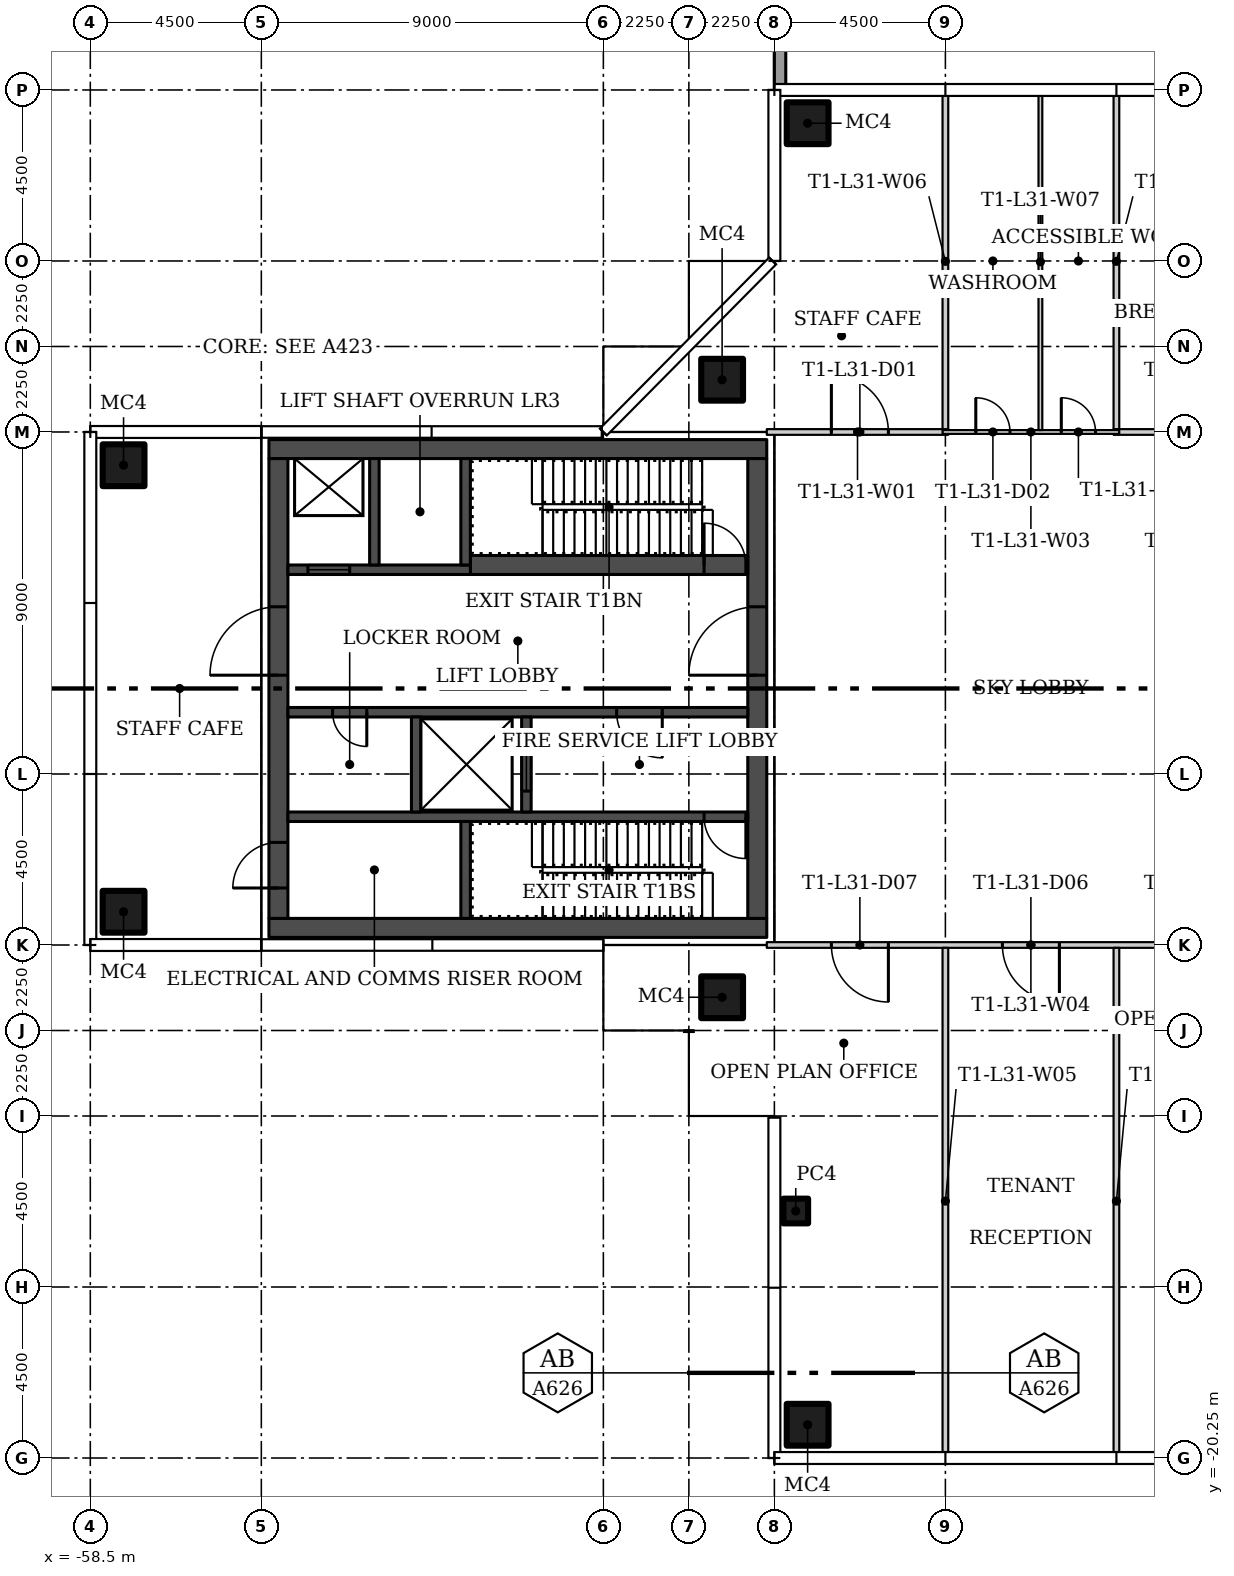
"""IFC4 building model, lengths in metres.
Left out: names, types, materials, properties, quantities, classifications, styles, units other than length and angle.
Written with IfcOpenShell. Run it as: python <this file> out.ifc"""

import sys

from ifc_helpers import new_model, si_unit, direction, frame, frame_2d, origin, origin_2d, place, context, subcontext, project, spatial, rectangle, hollow_rectangle, extrude, element, fill, save


model = new_model("IFC4")
c1 = context("Model", 3, precision=1e-05, world=origin(), true_north=direction((0.0, 1.0)))
c2 = subcontext(c1, "Body", "Model", "MODEL_VIEW")
j1 = project(units=[si_unit("LENGTHUNIT", "METRE"), si_unit("PLANEANGLEUNIT", "RADIAN")], contexts=[c1])
p1 = place(None, origin())
s1 = spatial("IfcSite", under=j1, at=p1, CompositionType="ELEMENT")
p2 = place(p1, origin())
s2 = spatial("IfcBuilding", under=s1, at=p2, CompositionType="ELEMENT")
p3 = place(p2, frame((0.0, 0.0, 133.5)))
s3 = spatial("IfcBuildingStorey", under=s2, at=p3, CompositionType="ELEMENT", Elevation=133.5)
for number, where in (
    (1, (-41.875, 8.125, 0.0)),
    (2, (-41.875, -8.125, 0.0)),
    (3, (-57.625, -5.875, 0.0)),
    (4, (-57.625, 5.875, 0.0)),
    (5, (-39.625, 14.875, 0.0)),
):
    element("IfcColumn", number, at=place(p3, frame(where)), inside=s3, PredefinedType="COLUMN", context=c2, shape_type="SweptSolid", body=[
        extrude(hollow_rectangle(XDim=1.1, YDim=1.1, WallThickness=0.04, at=origin_2d()), origin(), (0.0, 0.0, 1.0), 5.05),
    ])
p4 = place(p3, frame((-39.938, -13.75, 0.0)))
e6 = element("IfcColumn", 6, at=p4, inside=s3, PredefinedType="COLUMN", context=c2, shape_type="SweptSolid", body=[
    extrude(hollow_rectangle(XDim=0.65, YDim=0.65, WallThickness=0.02, at=origin_2d()), origin(), (0.0, 0.0, 1.0), 5.05),
])
p5 = place(p3, frame((-39.625, -19.375, 0.0)))
e7 = element("IfcColumn", 7, at=p5, inside=s3, PredefinedType="COLUMN", context=c2, shape_type="SweptSolid", body=[
    extrude(hollow_rectangle(XDim=1.1, YDim=1.1, WallThickness=0.04, at=origin_2d()), origin(), (0.0, 0.0, 1.0), 5.05),
])
p6 = place(p3, frame((-40.7, 6.75, 0.0)))
e8 = element("IfcWall", 8, at=p6, inside=s3, PredefinedType="PARTITIONING", context=c2, shape_type="SweptSolid", body=[
    extrude(rectangle(XDim=4.775, YDim=0.15, at=frame_2d((2.387, 0.0))), origin(), (0.0, 0.0, 1.0), 5.05),
])
p7 = place(p6, frame((1.7, 0.0, 0.0)))
e9 = element("IfcOpeningElement", 9, at=p7, cuts=e8, PredefinedType="OPENING", context=c2, shape_type="SweptSolid", body=[
    extrude(rectangle(XDim=1.5, YDim=2.1, at=frame_2d((0.75, 1.05))), frame((0.0, 0.085, 0.0), z_axis=(0.0, -1.0, 0.0), x_axis=(1.0, 0.0, 0.0)), (0.0, 0.0, 1.0), 0.17),
])
p8 = place(p3, frame((-31.575, 6.75, 0.0)))
e10 = element("IfcWall", 10, at=p8, inside=s3, PredefinedType="PARTITIONING", context=c2, shape_type="SweptSolid", body=[
    extrude(rectangle(XDim=4.775, YDim=0.15, at=frame_2d((2.387, 0.0))), origin(), (0.0, 0.0, 1.0), 5.05),
])
p9 = place(p8, frame((1.575, 0.0, 0.0)))
e11 = element("IfcOpeningElement", 11, at=p9, cuts=e10, PredefinedType="OPENING", context=c2, shape_type="SweptSolid", body=[
    extrude(rectangle(XDim=1.5, YDim=2.1, at=frame_2d((0.75, 1.05))), frame((0.0, 0.085, 0.0), z_axis=(0.0, -1.0, 0.0), x_axis=(1.0, 0.0, 0.0)), (0.0, 0.0, 1.0), 0.17),
])
p10 = place(p3, frame((-36.075, 6.75, 0.0)))
e12 = element("IfcWall", 12, at=p10, inside=s3, PredefinedType="PARTITIONING", context=c2, shape_type="SweptSolid", body=[
    extrude(rectangle(XDim=4.65, YDim=0.1, at=frame_2d((2.325, 0.0))), origin(), (0.0, 0.0, 1.0), 5.05),
])
p11 = place(p10, frame((0.875, 0.0, 0.0)))
e13 = element("IfcOpeningElement", 13, at=p11, cuts=e12, PredefinedType="OPENING", context=c2, shape_type="SweptSolid", body=[
    extrude(rectangle(XDim=0.9, YDim=2.1, at=frame_2d((0.45, 1.05))), frame((0.0, 0.06, 0.0), z_axis=(0.0, -1.0, 0.0), x_axis=(1.0, 0.0, 0.0)), (0.0, 0.0, 1.0), 0.12),
])
p12 = place(p10, frame((3.125, 0.0, 0.0)))
e14 = element("IfcOpeningElement", 14, at=p12, cuts=e12, PredefinedType="OPENING", context=c2, shape_type="SweptSolid", body=[
    extrude(rectangle(XDim=0.9, YDim=2.1, at=frame_2d((0.45, 1.05))), frame((0.0, 0.06, 0.0), z_axis=(0.0, -1.0, 0.0), x_axis=(1.0, 0.0, 0.0)), (0.0, 0.0, 1.0), 0.12),
])
p13 = place(p3, frame((-26.8, -6.75, 0.0), z_axis=(0.0, 0.0, 1.0), x_axis=(-1.0, 0.0, 0.0)))
e15 = element("IfcWall", 15, at=p13, inside=s3, PredefinedType="PARTITIONING", context=c2, shape_type="SweptSolid", body=[
    extrude(rectangle(XDim=13.9, YDim=0.15, at=frame_2d((6.95, 0.0))), origin(), (0.0, 0.0, 1.0), 5.05),
])
p14 = place(p13, frame((1.7, 0.0, 0.0)))
e16 = element("IfcOpeningElement", 16, at=p14, cuts=e15, PredefinedType="OPENING", context=c2, shape_type="SweptSolid", body=[
    extrude(rectangle(XDim=1.5, YDim=2.1, at=frame_2d((0.75, 1.05))), frame((0.0, 0.085, 0.0), z_axis=(0.0, -1.0, 0.0), x_axis=(1.0, 0.0, 0.0)), (0.0, 0.0, 1.0), 0.17),
])
p15 = place(p13, frame((6.2, 0.0, 0.0)))
e17 = element("IfcOpeningElement", 17, at=p15, cuts=e15, PredefinedType="OPENING", context=c2, shape_type="SweptSolid", body=[
    extrude(rectangle(XDim=1.5, YDim=2.1, at=frame_2d((0.75, 1.05))), frame((0.0, 0.085, 0.0), z_axis=(0.0, -1.0, 0.0), x_axis=(1.0, 0.0, 0.0)), (0.0, 0.0, 1.0), 0.17),
])
p16 = place(p13, frame((10.7, 0.0, 0.0)))
e18 = element("IfcOpeningElement", 18, at=p16, cuts=e15, PredefinedType="OPENING", context=c2, shape_type="SweptSolid", body=[
    extrude(rectangle(XDim=1.5, YDim=2.1, at=frame_2d((0.75, 1.05))), frame((0.0, 0.085, 0.0), z_axis=(0.0, -1.0, 0.0), x_axis=(1.0, 0.0, 0.0)), (0.0, 0.0, 1.0), 0.17),
])
p17 = place(p3, frame((-36.0, -20.155, 0.0), z_axis=(0.0, 0.0, 1.0), x_axis=(0.0, 1.0, 0.0)))
e19 = element("IfcWall", 19, at=p17, inside=s3, PredefinedType="PARTITIONING", context=c2, shape_type="SweptSolid", body=[
    extrude(rectangle(XDim=13.33, YDim=0.15, at=frame_2d((6.665, 0.0))), origin(), (0.0, 0.0, 1.0), 5.05),
])
p18 = place(p3, frame((-36.0, 6.825, 0.0), z_axis=(0.0, 0.0, 1.0), x_axis=(0.0, 1.0, 0.0)))
e20 = element("IfcWall", 20, at=p18, inside=s3, PredefinedType="PARTITIONING", context=c2, shape_type="SweptSolid", body=[
    extrude(rectangle(XDim=8.83, YDim=0.15, at=frame_2d((4.415, 0.0))), origin(), (0.0, 0.0, 1.0), 5.05),
])
p19 = place(p3, frame((-33.5, 6.8, 0.0), z_axis=(0.0, 0.0, 1.0), x_axis=(0.0, 1.0, 0.0)))
e21 = element("IfcWall", 21, at=p19, inside=s3, PredefinedType="PARTITIONING", context=c2, shape_type="SweptSolid", body=[
    extrude(rectangle(XDim=8.855, YDim=0.1, at=frame_2d((4.427, 0.0))), origin(), (0.0, 0.0, 1.0), 5.05),
])
p20 = place(p3, frame((-31.5, -20.155, 0.0), z_axis=(0.0, 0.0, 1.0), x_axis=(0.0, 1.0, 0.0)))
e22 = element("IfcWall", 22, at=p20, inside=s3, PredefinedType="PARTITIONING", context=c2, shape_type="SweptSolid", body=[
    extrude(rectangle(XDim=13.33, YDim=0.15, at=frame_2d((6.665, 0.0))), origin(), (0.0, 0.0, 1.0), 5.05),
])
p21 = place(p3, frame((-31.5, 6.825, 0.0), z_axis=(0.0, 0.0, 1.0), x_axis=(0.0, 1.0, 0.0)))
e23 = element("IfcWall", 23, at=p21, inside=s3, PredefinedType="PARTITIONING", context=c2, shape_type="SweptSolid", body=[
    extrude(rectangle(XDim=8.83, YDim=0.15, at=frame_2d((4.415, 0.0))), origin(), (0.0, 0.0, 1.0), 5.05),
])
p22 = place(p3, frame((-40.35, 19.95, 0.0), z_axis=(0.0, 0.0, 1.0), x_axis=(0.0, -1.0, 0.0)))
e24 = element("IfcWall", 24, at=p22, inside=s3, PredefinedType="PARAPET", context=c2, shape_type="SweptSolid", body=[
    extrude(rectangle(XDim=4.2, YDim=0.3, at=frame_2d((2.1, 0.0))), origin(), (0.0, 0.0, 1.0), 1.1),
])
for number, where, z_axis, x_axis in (
    (25, (-40.7, -6.3, 0.0), (0.0, 0.0, 1.0), (-1.0, 0.0, 0.0)),
    (26, (-40.7, 6.3, 0.0), (0.0, 0.0, 1.0), (-1.0, 0.0, 0.0)),
):
    element("IfcWall", number, at=place(p3, frame(where, z_axis=z_axis, x_axis=x_axis)), inside=s3, PredefinedType="SHEAR", context=c2, shape_type="SweptSolid", body=[
        extrude(rectangle(XDim=13.1, YDim=0.5, at=frame_2d((6.55, 0.0))), origin(), (0.0, 0.0, 1.0), 5.05),
    ])
p23 = place(p3, frame((-40.95, -6.05, 0.0), z_axis=(0.0, 0.0, 1.0), x_axis=(0.0, 1.0, 0.0)))
e27 = element("IfcWall", 27, at=p23, inside=s3, PredefinedType="SHEAR", context=c2, shape_type="SweptSolid", body=[
    extrude(rectangle(XDim=12.1, YDim=0.5, at=frame_2d((6.05, 0.0))), origin(), (0.0, 0.0, 1.0), 5.05),
])
p24 = place(p23, frame((6.4, 0.0, 0.0)))
e28 = element("IfcOpeningElement", 28, at=p24, cuts=e27, PredefinedType="OPENING", context=c2, shape_type="SweptSolid", body=[
    extrude(rectangle(XDim=1.8, YDim=2.4, at=frame_2d((0.9, 1.2))), frame((0.0, 0.26, 0.0), z_axis=(0.0, -1.0, 0.0), x_axis=(1.0, 0.0, 0.0)), (0.0, 0.0, 1.0), 0.52),
])
p25 = place(p3, frame((-53.55, -6.05, 0.0), z_axis=(0.0, 0.0, 1.0), x_axis=(0.0, 1.0, 0.0)))
e29 = element("IfcWall", 29, at=p25, inside=s3, PredefinedType="SHEAR", context=c2, shape_type="SweptSolid", body=[
    extrude(rectangle(XDim=12.1, YDim=0.5, at=frame_2d((6.05, 0.0))), origin(), (0.0, 0.0, 1.0), 5.05),
])
p26 = place(p25, frame((0.8, 0.0, 0.0)))
e30 = element("IfcOpeningElement", 30, at=p26, cuts=e29, PredefinedType="OPENING", context=c2, shape_type="SweptSolid", body=[
    extrude(rectangle(XDim=1.2, YDim=2.1, at=frame_2d((0.6, 1.05))), frame((0.0, 0.26, 0.0), z_axis=(0.0, -1.0, 0.0), x_axis=(1.0, 0.0, 0.0)), (0.0, 0.0, 1.0), 0.52),
])
p27 = place(p25, frame((6.4, 0.0, 0.0)))
e31 = element("IfcOpeningElement", 31, at=p27, cuts=e29, PredefinedType="OPENING", context=c2, shape_type="SweptSolid", body=[
    extrude(rectangle(XDim=1.8, YDim=2.4, at=frame_2d((0.9, 1.2))), frame((0.0, 0.26, 0.0), z_axis=(0.0, -1.0, 0.0), x_axis=(1.0, 0.0, 0.0)), (0.0, 0.0, 1.0), 0.52),
])
p28 = place(p3, frame((-41.2, -3.375, 0.0), z_axis=(0.0, 0.0, 1.0), x_axis=(-1.0, 0.0, 0.0)))
e32 = element("IfcWall", 32, at=p28, inside=s3, PredefinedType="SHEAR", context=c2, shape_type="SweptSolid", body=[
    extrude(rectangle(XDim=12.1, YDim=0.25, at=frame_2d((6.05, 0.0))), origin(), (0.0, 0.0, 1.0), 5.05),
])
p29 = place(p28, frame((0.05, 0.0, 0.0)))
e33 = element("IfcOpeningElement", 33, at=p29, cuts=e32, PredefinedType="OPENING", context=c2, shape_type="SweptSolid", body=[
    extrude(rectangle(XDim=1.1, YDim=2.1, at=frame_2d((0.55, 1.05))), frame((0.0, 0.135, 0.0), z_axis=(0.0, -1.0, 0.0), x_axis=(1.0, 0.0, 0.0)), (0.0, 0.0, 1.0), 0.27),
])
p30 = place(p3, frame((-48.625, -6.05, 0.0), z_axis=(0.0, 0.0, 1.0), x_axis=(0.0, 1.0, 0.0)))
e34 = element("IfcWall", 34, at=p30, inside=s3, PredefinedType="SHEAR", context=c2, shape_type="SweptSolid", body=[
    extrude(rectangle(XDim=2.55, YDim=0.25, at=frame_2d((1.275, 0.0))), origin(), (0.0, 0.0, 1.0), 5.05),
])
p31 = place(p3, frame((-41.2, -0.625, 0.0), z_axis=(0.0, 0.0, 1.0), x_axis=(-1.0, 0.0, 0.0)))
e35 = element("IfcWall", 35, at=p31, inside=s3, PredefinedType="SHEAR", context=c2, shape_type="SweptSolid", body=[
    extrude(rectangle(XDim=12.1, YDim=0.25, at=frame_2d((6.05, 0.0))), origin(), (0.0, 0.0, 1.0), 5.05),
])
p32 = place(p31, frame((2.25, 0.0, 0.0)))
e36 = element("IfcOpeningElement", 36, at=p32, cuts=e35, PredefinedType="OPENING", context=c2, shape_type="SweptSolid", body=[
    extrude(rectangle(XDim=1.2, YDim=2.1, at=frame_2d((0.6, 1.05))), frame((0.0, 0.135, 0.0), z_axis=(0.0, -1.0, 0.0), x_axis=(1.0, 0.0, 0.0)), (0.0, 0.0, 1.0), 0.27),
])
p33 = place(p31, frame((10.025, 0.0, 0.0)))
e37 = element("IfcOpeningElement", 37, at=p33, cuts=e35, PredefinedType="OPENING", context=c2, shape_type="SweptSolid", body=[
    extrude(rectangle(XDim=0.9, YDim=2.1, at=frame_2d((0.45, 1.05))), frame((0.0, 0.135, 0.0), z_axis=(0.0, -1.0, 0.0), x_axis=(1.0, 0.0, 0.0)), (0.0, 0.0, 1.0), 0.27),
])
p34 = place(p3, frame((-47.025, -3.25, 0.0), z_axis=(0.0, 0.0, 1.0), x_axis=(0.0, 1.0, 0.0)))
e38 = element("IfcWall", 38, at=p34, inside=s3, PredefinedType="SHEAR", context=c2, shape_type="SweptSolid", body=[
    extrude(rectangle(XDim=2.5, YDim=0.25, at=frame_2d((1.25, 0.0))), origin(), (0.0, 0.0, 1.0), 5.05),
])
p35 = place(p34, frame((0.55, 0.0, 0.0)))
e39 = element("IfcOpeningElement", 39, at=p35, cuts=e38, PredefinedType="OPENING", context=c2, shape_type="SweptSolid", body=[
    extrude(rectangle(XDim=1.4, YDim=2.4, at=frame_2d((0.7, 1.2))), frame((0.0, 0.135, 0.0), z_axis=(0.0, -1.0, 0.0), x_axis=(1.0, 0.0, 0.0)), (0.0, 0.0, 1.0), 0.27),
])
p36 = place(p3, frame((-49.925, -3.25, 0.0), z_axis=(0.0, 0.0, 1.0), x_axis=(0.0, 1.0, 0.0)))
e40 = element("IfcWall", 40, at=p36, inside=s3, PredefinedType="SHEAR", context=c2, shape_type="SweptSolid", body=[
    extrude(rectangle(XDim=2.5, YDim=0.25, at=frame_2d((1.25, 0.0))), origin(), (0.0, 0.0, 1.0), 5.05),
])
p37 = place(p3, frame((-48.5, 3.25, 0.0)))
e41 = element("IfcWall", 41, at=p37, inside=s3, PredefinedType="SHEAR", context=c2, shape_type="SweptSolid", body=[
    extrude(rectangle(XDim=7.3, YDim=0.5, at=frame_2d((3.65, 0.0))), origin(), (0.0, 0.0, 1.0), 5.05),
])
p38 = place(p37, frame((6.15, 0.0, 0.0)))
e42 = element("IfcOpeningElement", 42, at=p38, cuts=e41, PredefinedType="OPENING", context=c2, shape_type="SweptSolid", body=[
    extrude(rectangle(XDim=1.1, YDim=2.1, at=frame_2d((0.55, 1.05))), frame((0.0, 0.26, 0.0), z_axis=(0.0, -1.0, 0.0), x_axis=(1.0, 0.0, 0.0)), (0.0, 0.0, 1.0), 0.52),
])
p39 = place(p3, frame((-48.5, 3.125, 0.0), z_axis=(0.0, 0.0, 1.0), x_axis=(-1.0, 0.0, 0.0)))
e43 = element("IfcWall", 43, at=p39, inside=s3, PredefinedType="SHEAR", context=c2, shape_type="SweptSolid", body=[
    extrude(rectangle(XDim=4.8, YDim=0.25, at=frame_2d((2.4, 0.0))), origin(), (0.0, 0.0, 1.0), 5.05),
])
p40 = place(p39, frame((3.175, 0.0, 0.0)))
e44 = element("IfcOpeningElement", 44, at=p40, cuts=e43, PredefinedType="OPENING", context=c2, shape_type="SweptSolid", body=[
    extrude(rectangle(XDim=1.1, YDim=2.1, at=frame_2d((0.55, 1.05))), frame((0.0, 0.135, 0.0), z_axis=(0.0, -1.0, 0.0), x_axis=(1.0, 0.0, 0.0)), (0.0, 0.0, 1.0), 0.27),
])
for number, where, z_axis, x_axis in (
    (45, (-48.625, 3.25, 0.0), (0.0, 0.0, 1.0), (0.0, 1.0, 0.0)),
    (46, (-51.025, 3.25, 0.0), (0.0, 0.0, 1.0), (0.0, 1.0, 0.0)),
):
    element("IfcWall", number, at=place(p3, frame(where, z_axis=z_axis, x_axis=x_axis)), inside=s3, PredefinedType="SHEAR", context=c2, shape_type="SweptSolid", body=[
        extrude(rectangle(XDim=2.8, YDim=0.25, at=frame_2d((1.4, 0.0))), origin(), (0.0, 0.0, 1.0), 5.05),
    ])
p41 = place(p7, origin())
e47 = element("IfcDoor", 47, at=p41, inside=s3, OperationType="DOUBLE_DOOR_SINGLE_SWING", PredefinedType="DOOR", context=c2, shape_type="SweptSolid", body=[
    extrude(rectangle(XDim=1.5, YDim=2.1, at=frame_2d((0.75, 1.05))), frame((0.0, 0.025, 0.0), z_axis=(0.0, -1.0, 0.0), x_axis=(1.0, 0.0, 0.0)), (0.0, 0.0, 1.0), 0.05),
])
fill(e9, e47)
p42 = place(p11, origin())
e48 = element("IfcDoor", 48, at=p42, inside=s3, OperationType="SINGLE_SWING_RIGHT", PredefinedType="DOOR", context=c2, shape_type="SweptSolid", body=[
    extrude(rectangle(XDim=0.9, YDim=2.1, at=frame_2d((0.45, 1.05))), frame((0.0, 0.025, 0.0), z_axis=(0.0, -1.0, 0.0), x_axis=(1.0, 0.0, 0.0)), (0.0, 0.0, 1.0), 0.05),
])
fill(e13, e48)
p43 = place(p12, origin())
e49 = element("IfcDoor", 49, at=p43, inside=s3, OperationType="SINGLE_SWING_LEFT", PredefinedType="DOOR", context=c2, shape_type="SweptSolid", body=[
    extrude(rectangle(XDim=0.9, YDim=2.1, at=frame_2d((0.45, 1.05))), frame((0.0, 0.025, 0.0), z_axis=(0.0, -1.0, 0.0), x_axis=(1.0, 0.0, 0.0)), (0.0, 0.0, 1.0), 0.05),
])
fill(e14, e49)
p44 = place(p15, origin())
e50 = element("IfcDoor", 50, at=p44, inside=s3, OperationType="DOUBLE_DOOR_SINGLE_SWING", PredefinedType="DOOR", context=c2, shape_type="SweptSolid", body=[
    extrude(rectangle(XDim=1.5, YDim=2.1, at=frame_2d((0.75, 1.05))), frame((0.0, 0.025, 0.0), z_axis=(0.0, -1.0, 0.0), x_axis=(1.0, 0.0, 0.0)), (0.0, 0.0, 1.0), 0.05),
])
fill(e17, e50)
p45 = place(p16, origin())
e51 = element("IfcDoor", 51, at=p45, inside=s3, OperationType="DOUBLE_DOOR_SINGLE_SWING", PredefinedType="DOOR", context=c2, shape_type="SweptSolid", body=[
    extrude(rectangle(XDim=1.5, YDim=2.1, at=frame_2d((0.75, 1.05))), frame((0.0, 0.025, 0.0), z_axis=(0.0, -1.0, 0.0), x_axis=(1.0, 0.0, 0.0)), (0.0, 0.0, 1.0), 0.05),
])
fill(e18, e51)
p46 = place(p24, origin())
e52 = element("IfcDoor", 52, at=p46, inside=s3, OperationType="DOUBLE_DOOR_SINGLE_SWING", PredefinedType="DOOR", context=c2, shape_type="SweptSolid", body=[
    extrude(rectangle(XDim=1.8, YDim=2.4, at=frame_2d((0.9, 1.2))), frame((0.0, 0.025, 0.0), z_axis=(0.0, -1.0, 0.0), x_axis=(1.0, 0.0, 0.0)), (0.0, 0.0, 1.0), 0.05),
])
fill(e28, e52)
p47 = place(p26, origin())
e53 = element("IfcDoor", 53, at=p47, inside=s3, OperationType="SINGLE_SWING_LEFT", PredefinedType="DOOR", context=c2, shape_type="SweptSolid", body=[
    extrude(rectangle(XDim=1.2, YDim=2.1, at=frame_2d((0.6, 1.05))), frame((0.0, 0.025, 0.0), z_axis=(0.0, -1.0, 0.0), x_axis=(1.0, 0.0, 0.0)), (0.0, 0.0, 1.0), 0.05),
])
fill(e30, e53)
p48 = place(p27, origin())
e54 = element("IfcDoor", 54, at=p48, inside=s3, OperationType="DOUBLE_DOOR_SINGLE_SWING", PredefinedType="DOOR", context=c2, shape_type="SweptSolid", body=[
    extrude(rectangle(XDim=1.8, YDim=2.4, at=frame_2d((0.9, 1.2))), frame((0.0, 0.025, 0.0), z_axis=(0.0, -1.0, 0.0), x_axis=(1.0, 0.0, 0.0)), (0.0, 0.0, 1.0), 0.05),
])
fill(e31, e54)
p49 = place(p29, origin())
e55 = element("IfcDoor", 55, at=p49, inside=s3, OperationType="SINGLE_SWING_LEFT", PredefinedType="DOOR", context=c2, shape_type="SweptSolid", body=[
    extrude(rectangle(XDim=1.1, YDim=2.1, at=frame_2d((0.55, 1.05))), frame((0.0, 0.025, 0.0), z_axis=(0.0, -1.0, 0.0), x_axis=(1.0, 0.0, 0.0)), (0.0, 0.0, 1.0), 0.05),
])
fill(e33, e55)
p50 = place(p32, origin())
e56 = element("IfcDoor", 56, at=p50, inside=s3, OperationType="SINGLE_SWING_LEFT", PredefinedType="DOOR", context=c2, shape_type="SweptSolid", body=[
    extrude(rectangle(XDim=1.2, YDim=2.1, at=frame_2d((0.6, 1.05))), frame((0.0, 0.025, 0.0), z_axis=(0.0, -1.0, 0.0), x_axis=(1.0, 0.0, 0.0)), (0.0, 0.0, 1.0), 0.05),
])
fill(e36, e56)
p51 = place(p33, origin())
e57 = element("IfcDoor", 57, at=p51, inside=s3, OperationType="SINGLE_SWING_RIGHT", PredefinedType="DOOR", context=c2, shape_type="SweptSolid", body=[
    extrude(rectangle(XDim=0.9, YDim=2.1, at=frame_2d((0.45, 1.05))), frame((0.0, 0.025, 0.0), z_axis=(0.0, -1.0, 0.0), x_axis=(1.0, 0.0, 0.0)), (0.0, 0.0, 1.0), 0.05),
])
fill(e37, e57)
p52 = place(p35, origin())
e58 = element("IfcDoor", 58, at=p52, inside=s3, OperationType="SLIDING_TO_LEFT", PredefinedType="DOOR", context=c2, shape_type="SweptSolid", body=[
    extrude(rectangle(XDim=1.4, YDim=2.4, at=frame_2d((0.7, 1.2))), frame((0.0, 0.025, 0.0), z_axis=(0.0, -1.0, 0.0), x_axis=(1.0, 0.0, 0.0)), (0.0, 0.0, 1.0), 0.05),
])
fill(e39, e58)
p53 = place(p38, origin())
e59 = element("IfcDoor", 59, at=p53, inside=s3, OperationType="SINGLE_SWING_RIGHT", PredefinedType="DOOR", context=c2, shape_type="SweptSolid", body=[
    extrude(rectangle(XDim=1.1, YDim=2.1, at=frame_2d((0.55, 1.05))), frame((0.0, 0.025, 0.0), z_axis=(0.0, -1.0, 0.0), x_axis=(1.0, 0.0, 0.0)), (0.0, 0.0, 1.0), 0.05),
])
fill(e42, e59)
p54 = place(p40, origin())
e60 = element("IfcDoor", 60, at=p54, inside=s3, OperationType="SLIDING_TO_LEFT", PredefinedType="DOOR", context=c2, shape_type="SweptSolid", body=[
    extrude(rectangle(XDim=1.1, YDim=2.1, at=frame_2d((0.55, 1.05))), frame((0.0, 0.025, 0.0), z_axis=(0.0, -1.0, 0.0), x_axis=(1.0, 0.0, 0.0)), (0.0, 0.0, 1.0), 0.05),
])
fill(e44, e60)
save(model, sys.argv[1])
